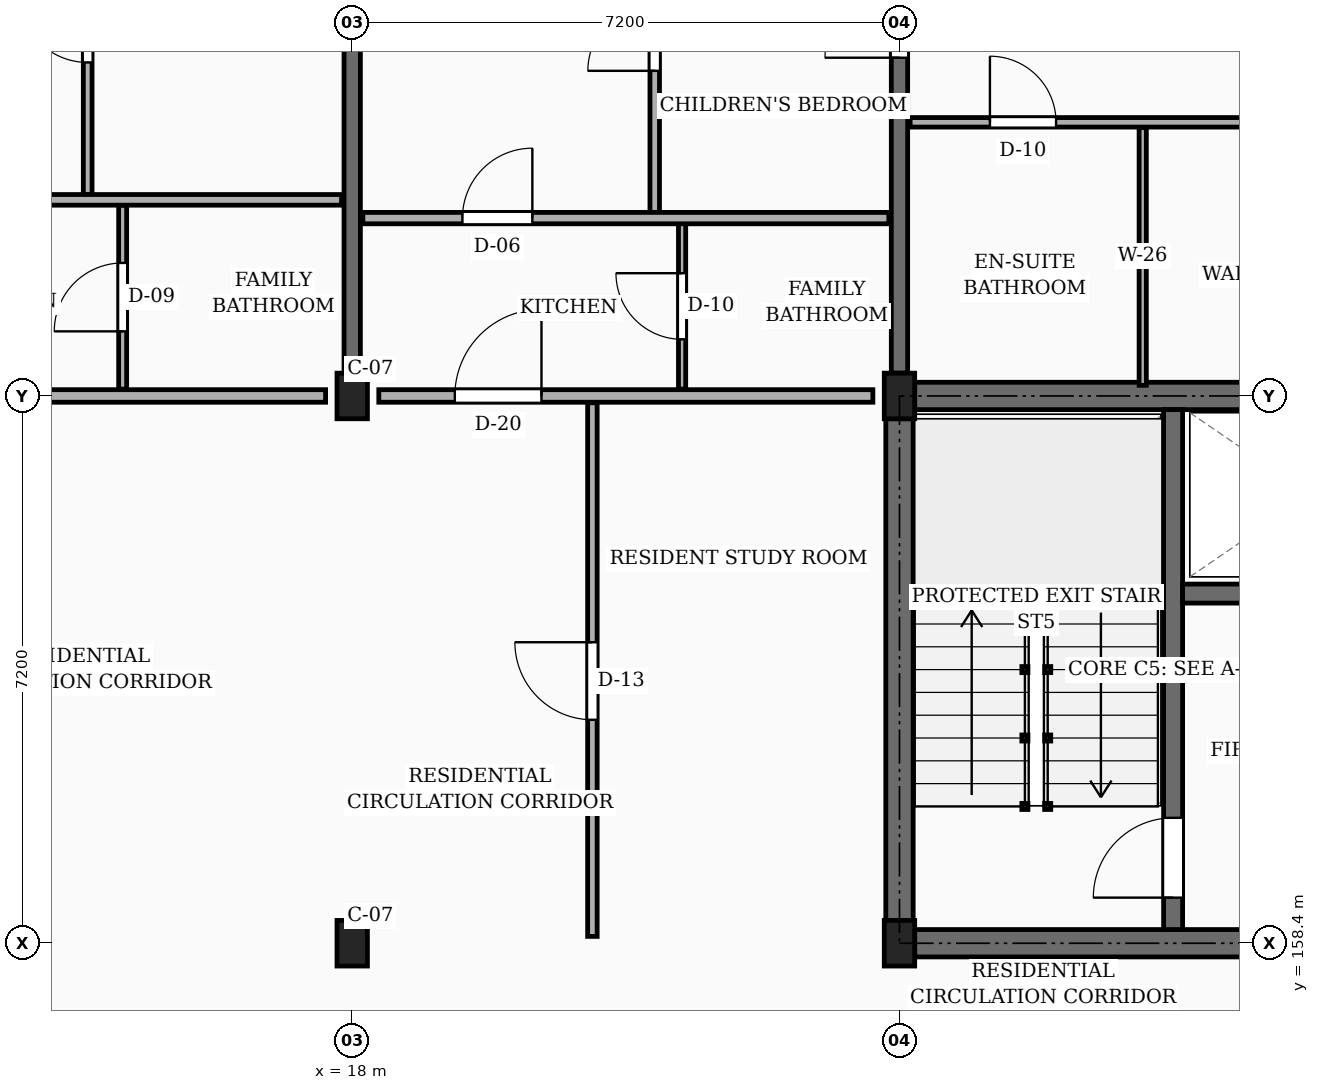
"""IFC4 building model, lengths in metres.
Left out: names, types, materials, properties, quantities, classifications, styles, units other than length and angle.
Written with IfcOpenShell. Run it as: python <this file> out.ifc"""

import sys

from ifc_helpers import new_model, si_unit, direction, frame, frame_2d, origin, origin_2d, place, context, subcontext, project, spatial, rectangle, extrude, element, fill, save


model = new_model("IFC4")
c1 = context("Model", 3, precision=1e-05, world=origin(), true_north=direction((0.0, 1.0)))
c2 = subcontext(c1, "Body", "Model", "MODEL_VIEW")
j1 = project(units=[si_unit("LENGTHUNIT", "METRE"), si_unit("PLANEANGLEUNIT", "RADIAN")], contexts=[c1])
p1 = place(None, origin())
s1 = spatial("IfcSite", under=j1, at=p1, CompositionType="ELEMENT")
p2 = place(p1, origin())
s2 = spatial("IfcBuilding", under=s1, at=p2, CompositionType="ELEMENT")
p3 = place(p2, frame((0.0, 0.0, 26.55)))
s3 = spatial("IfcBuildingStorey", under=s2, at=p3, CompositionType="ELEMENT", Elevation=26.55)
for number, where, z_axis, x_axis in (
    (1, (18.0, 158.4, 0.0), (0.0, 0.0, 1.0), (1.0, 0.0, 0.0)),
    (2, (18.0, 165.6, 0.0), (0.0, 0.0, 1.0), (1.0, 0.0, 0.0)),
    (3, (25.2, 158.4, 0.0), (0.0, 0.0, 1.0), (1.0, 0.0, 0.0)),
    (4, (25.2, 165.6, 0.0), (0.0, 0.0, 1.0), (1.0, 0.0, 0.0)),
):
    element("IfcColumn", number, at=place(p3, frame(where, z_axis=z_axis, x_axis=x_axis)), inside=s3, PredefinedType="COLUMN", context=c2, shape_type="SweptSolid", body=[
        extrude(rectangle(XDim=0.4, YDim=0.6, at=origin_2d()), origin(), (0.0, 0.0, 1.0), 3.15),
    ])
p4 = place(p3, frame((18.0, 165.9, 0.0), z_axis=(0.0, 0.0, 1.0), x_axis=(0.0, 1.0, 0.0)))
e5 = element("IfcWall", 5, at=p4, inside=s3, PredefinedType="SOLIDWALL", context=c2, shape_type="SweptSolid", body=[
    extrude(rectangle(XDim=6.65, YDim=0.215, at=frame_2d((3.325, 0.0))), origin(), (0.0, 0.0, 1.0), 2.185),
])
p5 = place(p3, frame((25.2, 165.9, 0.0), z_axis=(0.0, 0.0, 1.0), x_axis=(0.0, 1.0, 0.0)))
e6 = element("IfcWall", 6, at=p5, inside=s3, PredefinedType="SOLIDWALL", context=c2, shape_type="SweptSolid", body=[
    extrude(rectangle(XDim=6.65, YDim=0.215, at=frame_2d((3.325, 0.0))), origin(), (0.0, 0.0, 1.0), 2.185),
])
p6 = place(p5, frame((4.15, 0.0, 0.0)))
e7 = element("IfcOpeningElement", 7, at=p6, cuts=e6, PredefinedType="OPENING", context=c2, shape_type="SweptSolid", body=[
    extrude(rectangle(XDim=0.98, YDim=2.12, at=frame_2d((0.49, 1.06))), frame((0.0, 0.118, 0.0), z_axis=(0.0, -1.0, 0.0), x_axis=(1.0, 0.0, 0.0)), (0.0, 0.0, 1.0), 0.235),
])
p7 = place(p3, frame((25.2, 158.7, 0.0), z_axis=(0.0, 0.0, 1.0), x_axis=(0.0, 1.0, 0.0)))
e8 = element("IfcWall", 8, at=p7, inside=s3, PredefinedType="SHEAR", context=c2, shape_type="SweptSolid", body=[
    extrude(rectangle(XDim=6.6, YDim=0.36, at=frame_2d((3.3, 0.0))), origin(), (0.0, 0.0, 1.0), 2.885),
])
p8 = place(p3, frame((25.4, 165.6, 0.0), z_axis=(0.0, 0.0, 1.0), x_axis=(1.0, 0.0, 0.0)))
e9 = element("IfcWall", 9, at=p8, inside=s3, PredefinedType="SHEAR", context=c2, shape_type="SweptSolid", body=[
    extrude(rectangle(XDim=6.8, YDim=0.36, at=frame_2d((3.4, 0.0))), origin(), (0.0, 0.0, 1.0), 2.885),
])
p9 = place(p3, frame((25.4, 158.4, 0.0), z_axis=(0.0, 0.0, 1.0), x_axis=(1.0, 0.0, 0.0)))
e10 = element("IfcWall", 10, at=p9, inside=s3, PredefinedType="SHEAR", context=c2, shape_type="SweptSolid", body=[
    extrude(rectangle(XDim=6.8, YDim=0.36, at=frame_2d((3.4, 0.0))), origin(), (0.0, 0.0, 1.0), 2.885),
])
p10 = place(p9, frame((4.55, 0.0, 0.0)))
e11 = element("IfcOpeningElement", 11, at=p10, cuts=e10, PredefinedType="OPENING", context=c2, shape_type="SweptSolid", body=[
    extrude(rectangle(XDim=1.1, YDim=2.15, at=frame_2d((0.55, 1.075))), frame((0.0, 0.19, 0.0), z_axis=(0.0, -1.0, 0.0), x_axis=(1.0, 0.0, 0.0)), (0.0, 0.0, 1.0), 0.38),
])
p11 = place(p3, frame((28.8, 158.58, 0.0), z_axis=(0.0, 0.0, 1.0), x_axis=(0.0, 1.0, 0.0)))
e12 = element("IfcWall", 12, at=p11, inside=s3, PredefinedType="SHEAR", context=c2, shape_type="SweptSolid", body=[
    extrude(rectangle(XDim=6.84, YDim=0.25, at=frame_2d((3.42, 0.0))), origin(), (0.0, 0.0, 1.0), 2.885),
])
p12 = place(p11, frame((0.42, 0.0, 0.0)))
e13 = element("IfcOpeningElement", 13, at=p12, cuts=e12, PredefinedType="OPENING", context=c2, shape_type="SweptSolid", body=[
    extrude(rectangle(XDim=1.05, YDim=2.15, at=frame_2d((0.525, 1.075))), frame((0.0, 0.135, 0.0), z_axis=(0.0, -1.0, 0.0), x_axis=(1.0, 0.0, 0.0)), (0.0, 0.0, 1.0), 0.27),
])
p13 = place(p3, frame((28.925, 163.0, 0.0), z_axis=(0.0, 0.0, 1.0), x_axis=(1.0, 0.0, 0.0)))
e14 = element("IfcWall", 14, at=p13, inside=s3, PredefinedType="SHEAR", context=c2, shape_type="SweptSolid", body=[
    extrude(rectangle(XDim=3.295, YDim=0.25, at=frame_2d((1.647, 0.0))), origin(), (0.0, 0.0, 1.0), 2.885),
])
p14 = place(p13, frame((1.1, 0.0, 0.0)))
e15 = element("IfcOpeningElement", 15, at=p14, cuts=e14, PredefinedType="OPENING", context=c2, shape_type="SweptSolid", body=[
    extrude(rectangle(XDim=1.1, YDim=2.2, at=frame_2d((0.55, 1.1))), frame((0.0, 0.135, 0.0), z_axis=(0.0, -1.0, 0.0), x_axis=(1.0, 0.0, 0.0)), (0.0, 0.0, 1.0), 0.27),
])
p15 = place(p3, frame((11.15, 165.6, 0.0), z_axis=(0.0, 0.0, 1.0), x_axis=(1.0, 0.0, 0.0)))
e16 = element("IfcWall", 16, at=p15, inside=s3, PredefinedType="PARTITIONING", context=c2, shape_type="SweptSolid", body=[
    extrude(rectangle(XDim=6.5, YDim=0.165, at=frame_2d((3.25, 0.0))), origin(), (0.0, 0.0, 1.0), 2.32),
])
p16 = place(p15, frame((1.0, 0.0, 0.0)))
e17 = element("IfcOpeningElement", 17, at=p16, cuts=e16, PredefinedType="OPENING", context=c2, shape_type="SweptSolid", body=[
    extrude(rectangle(XDim=0.94, YDim=2.12, at=frame_2d((0.47, 1.06))), frame((0.0, 0.093, 0.0), z_axis=(0.0, -1.0, 0.0), x_axis=(1.0, 0.0, 0.0)), (0.0, 0.0, 1.0), 0.185),
])
p17 = place(p3, frame((18.35, 165.6, 0.0), z_axis=(0.0, 0.0, 1.0), x_axis=(1.0, 0.0, 0.0)))
e18 = element("IfcWall", 18, at=p17, inside=s3, PredefinedType="PARTITIONING", context=c2, shape_type="SweptSolid", body=[
    extrude(rectangle(XDim=6.5, YDim=0.165, at=frame_2d((3.25, 0.0))), origin(), (0.0, 0.0, 1.0), 2.32),
])
p18 = place(p17, frame((1.0, 0.0, 0.0)))
e19 = element("IfcOpeningElement", 19, at=p18, cuts=e18, PredefinedType="OPENING", context=c2, shape_type="SweptSolid", body=[
    extrude(rectangle(XDim=1.14, YDim=2.18, at=frame_2d((0.57, 1.09))), frame((0.0, 0.093, 0.0), z_axis=(0.0, -1.0, 0.0), x_axis=(1.0, 0.0, 0.0)), (0.0, 0.0, 1.0), 0.185),
])
p19 = place(p3, frame((14.52, 168.25, 0.0), z_axis=(0.0, 0.0, 1.0), x_axis=(0.0, 1.0, 0.0)))
e20 = element("IfcWall", 20, at=p19, inside=s3, PredefinedType="PARTITIONING", context=c2, shape_type="SweptSolid", body=[
    extrude(rectangle(XDim=4.375, YDim=0.115, at=frame_2d((2.188, 0.0))), origin(), (0.0, 0.0, 1.0), 2.32),
])
p20 = place(p19, frame((1.738, 0.0, 0.0)))
e21 = element("IfcOpeningElement", 21, at=p20, cuts=e20, PredefinedType="OPENING", context=c2, shape_type="SweptSolid", body=[
    extrude(rectangle(XDim=0.9, YDim=2.1, at=frame_2d((0.45, 1.05))), frame((0.0, 0.067, 0.0), z_axis=(0.0, -1.0, 0.0), x_axis=(1.0, 0.0, 0.0)), (0.0, 0.0, 1.0), 0.135),
])
p21 = place(p3, frame((14.98, 165.69, 0.0), z_axis=(0.0, 0.0, 1.0), x_axis=(0.0, 1.0, 0.0)))
e22 = element("IfcWall", 22, at=p21, inside=s3, PredefinedType="PARTITIONING", context=c2, shape_type="SweptSolid", body=[
    extrude(rectangle(XDim=2.42, YDim=0.105, at=frame_2d((1.21, 0.0))), origin(), (0.0, 0.0, 1.0), 2.32),
])
p22 = place(p21, frame((0.76, 0.0, 0.0)))
e23 = element("IfcOpeningElement", 23, at=p22, cuts=e22, PredefinedType="OPENING", context=c2, shape_type="SweptSolid", body=[
    extrude(rectangle(XDim=0.9, YDim=2.05, at=frame_2d((0.45, 1.025))), frame((0.0, 0.062, 0.0), z_axis=(0.0, -1.0, 0.0), x_axis=(1.0, 0.0, 0.0)), (0.0, 0.0, 1.0), 0.125),
])
p23 = place(p3, frame((10.975, 168.18, 0.0), z_axis=(0.0, 0.0, 1.0), x_axis=(1.0, 0.0, 0.0)))
e24 = element("IfcWall", 24, at=p23, inside=s3, PredefinedType="PARTITIONING", context=c2, shape_type="SweptSolid", body=[
    extrude(rectangle(XDim=6.885, YDim=0.14, at=frame_2d((3.442, 0.0))), origin(), (0.0, 0.0, 1.0), 2.32),
])
p24 = place(p23, frame((1.275, 0.0, 0.0)))
e25 = element("IfcOpeningElement", 25, at=p24, cuts=e24, PredefinedType="OPENING", context=c2, shape_type="SweptSolid", body=[
    extrude(rectangle(XDim=0.95, YDim=2.1, at=frame_2d((0.475, 1.05))), frame((0.0, 0.08, 0.0), z_axis=(0.0, -1.0, 0.0), x_axis=(1.0, 0.0, 0.0)), (0.0, 0.0, 1.0), 0.16),
])
p25 = place(p3, frame((21.16, 158.49, 0.0), z_axis=(0.0, 0.0, 1.0), x_axis=(0.0, 1.0, 0.0)))
e26 = element("IfcWall", 26, at=p25, inside=s3, PredefinedType="PARTITIONING", context=c2, shape_type="SweptSolid", body=[
    extrude(rectangle(XDim=7.02, YDim=0.125, at=frame_2d((3.51, 0.0))), origin(), (0.0, 0.0, 1.0), 2.32),
])
p26 = place(p25, frame((2.85, 0.0, 0.0)))
e27 = element("IfcOpeningElement", 27, at=p26, cuts=e26, PredefinedType="OPENING", context=c2, shape_type="SweptSolid", body=[
    extrude(rectangle(XDim=1.02, YDim=2.15, at=frame_2d((0.51, 1.075))), frame((0.0, 0.073, 0.0), z_axis=(0.0, -1.0, 0.0), x_axis=(1.0, 0.0, 0.0)), (0.0, 0.0, 1.0), 0.145),
])
p27 = place(p3, frame((21.98, 168.01, 0.0), z_axis=(0.0, 0.0, 1.0), x_axis=(0.0, 1.0, 0.0)))
e28 = element("IfcWall", 28, at=p27, inside=s3, PredefinedType="PARTITIONING", context=c2, shape_type="SweptSolid", body=[
    extrude(rectangle(XDim=4.615, YDim=0.125, at=frame_2d((2.308, 0.0))), origin(), (0.0, 0.0, 1.0), 2.32),
])
p28 = place(p27, frame((1.867, 0.0, 0.0)))
e29 = element("IfcOpeningElement", 29, at=p28, cuts=e28, PredefinedType="OPENING", context=c2, shape_type="SweptSolid", body=[
    extrude(rectangle(XDim=0.88, YDim=2.08, at=frame_2d((0.44, 1.04))), frame((0.0, 0.073, 0.0), z_axis=(0.0, -1.0, 0.0), x_axis=(1.0, 0.0, 0.0)), (0.0, 0.0, 1.0), 0.145),
])
p29 = place(p3, frame((22.34, 165.69, 0.0), z_axis=(0.0, 0.0, 1.0), x_axis=(0.0, 1.0, 0.0)))
e30 = element("IfcWall", 30, at=p29, inside=s3, PredefinedType="PARTITIONING", context=c2, shape_type="SweptSolid", body=[
    extrude(rectangle(XDim=2.18, YDim=0.095, at=frame_2d((1.09, 0.0))), origin(), (0.0, 0.0, 1.0), 2.32),
])
p30 = place(p29, frame((0.655, 0.0, 0.0)))
e31 = element("IfcOpeningElement", 31, at=p30, cuts=e30, PredefinedType="OPENING", context=c2, shape_type="SweptSolid", body=[
    extrude(rectangle(XDim=0.87, YDim=2.05, at=frame_2d((0.435, 1.025))), frame((0.0, 0.058, 0.0), z_axis=(0.0, -1.0, 0.0), x_axis=(1.0, 0.0, 0.0)), (0.0, 0.0, 1.0), 0.115),
])
p31 = place(p3, frame((18.14, 167.94, 0.0), z_axis=(0.0, 0.0, 1.0), x_axis=(1.0, 0.0, 0.0)))
e32 = element("IfcWall", 32, at=p31, inside=s3, PredefinedType="PARTITIONING", context=c2, shape_type="SweptSolid", body=[
    extrude(rectangle(XDim=6.92, YDim=0.15, at=frame_2d((3.46, 0.0))), origin(), (0.0, 0.0, 1.0), 2.32),
])
p32 = place(p31, frame((1.31, 0.0, 0.0)))
e33 = element("IfcOpeningElement", 33, at=p32, cuts=e32, PredefinedType="OPENING", context=c2, shape_type="SweptSolid", body=[
    extrude(rectangle(XDim=0.92, YDim=2.1, at=frame_2d((0.46, 1.05))), frame((0.0, 0.085, 0.0), z_axis=(0.0, -1.0, 0.0), x_axis=(1.0, 0.0, 0.0)), (0.0, 0.0, 1.0), 0.17),
])
p33 = place(p3, frame((25.34, 169.2, 0.0), z_axis=(0.0, 0.0, 1.0), x_axis=(1.0, 0.0, 0.0)))
e34 = element("IfcWall", 34, at=p33, inside=s3, PredefinedType="PARTITIONING", context=c2, shape_type="SweptSolid", body=[
    extrude(rectangle(XDim=6.92, YDim=0.125, at=frame_2d((3.46, 0.0))), origin(), (0.0, 0.0, 1.0), 2.32),
])
p34 = place(p33, frame((1.05, 0.0, 0.0)))
e35 = element("IfcOpeningElement", 35, at=p34, cuts=e34, PredefinedType="OPENING", context=c2, shape_type="SweptSolid", body=[
    extrude(rectangle(XDim=0.87, YDim=2.05, at=frame_2d((0.435, 1.025))), frame((0.0, 0.073, 0.0), z_axis=(0.0, -1.0, 0.0), x_axis=(1.0, 0.0, 0.0)), (0.0, 0.0, 1.0), 0.145),
])
p35 = place(p33, frame((4.45, 0.0, 0.0)))
e36 = element("IfcOpeningElement", 36, at=p35, cuts=e34, PredefinedType="OPENING", context=c2, shape_type="SweptSolid", body=[
    extrude(rectangle(XDim=0.88, YDim=2.08, at=frame_2d((0.44, 1.04))), frame((0.0, 0.073, 0.0), z_axis=(0.0, -1.0, 0.0), x_axis=(1.0, 0.0, 0.0)), (0.0, 0.0, 1.0), 0.145),
])
p36 = place(p3, frame((28.4, 165.74, 0.0), z_axis=(0.0, 0.0, 1.0), x_axis=(0.0, 1.0, 0.0)))
e37 = element("IfcWall", 37, at=p36, inside=s3, PredefinedType="PARTITIONING", context=c2, shape_type="SweptSolid", body=[
    extrude(rectangle(XDim=3.39, YDim=0.095, at=frame_2d((1.695, 0.0))), origin(), (0.0, 0.0, 1.0), 2.32),
])
p37 = place(p12, origin())
e38 = element("IfcDoor", 38, at=p37, inside=s3, OperationType="SINGLE_SWING_LEFT", PredefinedType="DOOR", context=c2, shape_type="SweptSolid", body=[
    extrude(rectangle(XDim=1.05, YDim=2.15, at=frame_2d((0.525, 1.075))), frame((0.0, 0.025, 0.0), z_axis=(0.0, -1.0, 0.0), x_axis=(1.0, 0.0, 0.0)), (0.0, 0.0, 1.0), 0.05),
])
fill(e13, e38)
p38 = place(p18, origin())
e39 = element("IfcDoor", 39, at=p38, inside=s3, OperationType="SINGLE_SWING_RIGHT", PredefinedType="DOOR", context=c2, shape_type="SweptSolid", body=[
    extrude(rectangle(XDim=1.14, YDim=2.18, at=frame_2d((0.57, 1.09))), frame((0.0, 0.025, 0.0), z_axis=(0.0, -1.0, 0.0), x_axis=(1.0, 0.0, 0.0)), (0.0, 0.0, 1.0), 0.05),
])
fill(e19, e39)
p39 = place(p20, origin())
e40 = element("IfcDoor", 40, at=p39, inside=s3, OperationType="SINGLE_SWING_RIGHT", PredefinedType="DOOR", context=c2, shape_type="SweptSolid", body=[
    extrude(rectangle(XDim=0.9, YDim=2.1, at=frame_2d((0.45, 1.05))), frame((0.0, 0.025, 0.0), z_axis=(0.0, -1.0, 0.0), x_axis=(1.0, 0.0, 0.0)), (0.0, 0.0, 1.0), 0.05),
])
fill(e21, e40)
p40 = place(p22, origin())
e41 = element("IfcDoor", 41, at=p40, inside=s3, OperationType="SINGLE_SWING_LEFT", PredefinedType="DOOR", context=c2, shape_type="SweptSolid", body=[
    extrude(rectangle(XDim=0.9, YDim=2.05, at=frame_2d((0.45, 1.025))), frame((0.0, 0.025, 0.0), z_axis=(0.0, -1.0, 0.0), x_axis=(1.0, 0.0, 0.0)), (0.0, 0.0, 1.0), 0.05),
])
fill(e23, e41)
p41 = place(p26, origin())
e42 = element("IfcDoor", 42, at=p41, inside=s3, OperationType="SINGLE_SWING_RIGHT", PredefinedType="DOOR", context=c2, shape_type="SweptSolid", body=[
    extrude(rectangle(XDim=1.02, YDim=2.15, at=frame_2d((0.51, 1.075))), frame((0.0, 0.025, 0.0), z_axis=(0.0, -1.0, 0.0), x_axis=(1.0, 0.0, 0.0)), (0.0, 0.0, 1.0), 0.05),
])
fill(e27, e42)
p42 = place(p28, origin())
e43 = element("IfcDoor", 43, at=p42, inside=s3, OperationType="SINGLE_SWING_LEFT", PredefinedType="DOOR", context=c2, shape_type="SweptSolid", body=[
    extrude(rectangle(XDim=0.88, YDim=2.08, at=frame_2d((0.44, 1.04))), frame((0.0, 0.025, 0.0), z_axis=(0.0, -1.0, 0.0), x_axis=(1.0, 0.0, 0.0)), (0.0, 0.0, 1.0), 0.05),
])
fill(e29, e43)
p43 = place(p30, origin())
e44 = element("IfcDoor", 44, at=p43, inside=s3, OperationType="SINGLE_SWING_RIGHT", PredefinedType="DOOR", context=c2, shape_type="SweptSolid", body=[
    extrude(rectangle(XDim=0.87, YDim=2.05, at=frame_2d((0.435, 1.025))), frame((0.0, 0.025, 0.0), z_axis=(0.0, -1.0, 0.0), x_axis=(1.0, 0.0, 0.0)), (0.0, 0.0, 1.0), 0.05),
])
fill(e31, e44)
p44 = place(p32, origin())
e45 = element("IfcDoor", 45, at=p44, inside=s3, OperationType="SINGLE_SWING_RIGHT", PredefinedType="DOOR", context=c2, shape_type="SweptSolid", body=[
    extrude(rectangle(XDim=0.92, YDim=2.1, at=frame_2d((0.46, 1.05))), frame((0.0, 0.025, 0.0), z_axis=(0.0, -1.0, 0.0), x_axis=(1.0, 0.0, 0.0)), (0.0, 0.0, 1.0), 0.05),
])
fill(e33, e45)
p45 = place(p34, origin())
e46 = element("IfcDoor", 46, at=p45, inside=s3, OperationType="SINGLE_SWING_LEFT", PredefinedType="DOOR", context=c2, shape_type="SweptSolid", body=[
    extrude(rectangle(XDim=0.87, YDim=2.05, at=frame_2d((0.435, 1.025))), frame((0.0, 0.025, 0.0), z_axis=(0.0, -1.0, 0.0), x_axis=(1.0, 0.0, 0.0)), (0.0, 0.0, 1.0), 0.05),
])
fill(e35, e46)
p46 = place(p6, origin())
e47 = element("IfcDoor", 47, at=p46, inside=s3, OperationType="SINGLE_SWING_LEFT", PredefinedType="DOOR", context=c2, shape_type="SweptSolid", body=[
    extrude(rectangle(XDim=0.98, YDim=2.12, at=frame_2d((0.49, 1.06))), frame((0.0, 0.025, 0.0), z_axis=(0.0, -1.0, 0.0), x_axis=(1.0, 0.0, 0.0)), (0.0, 0.0, 1.0), 0.05),
])
fill(e7, e47)
save(model, sys.argv[1])
